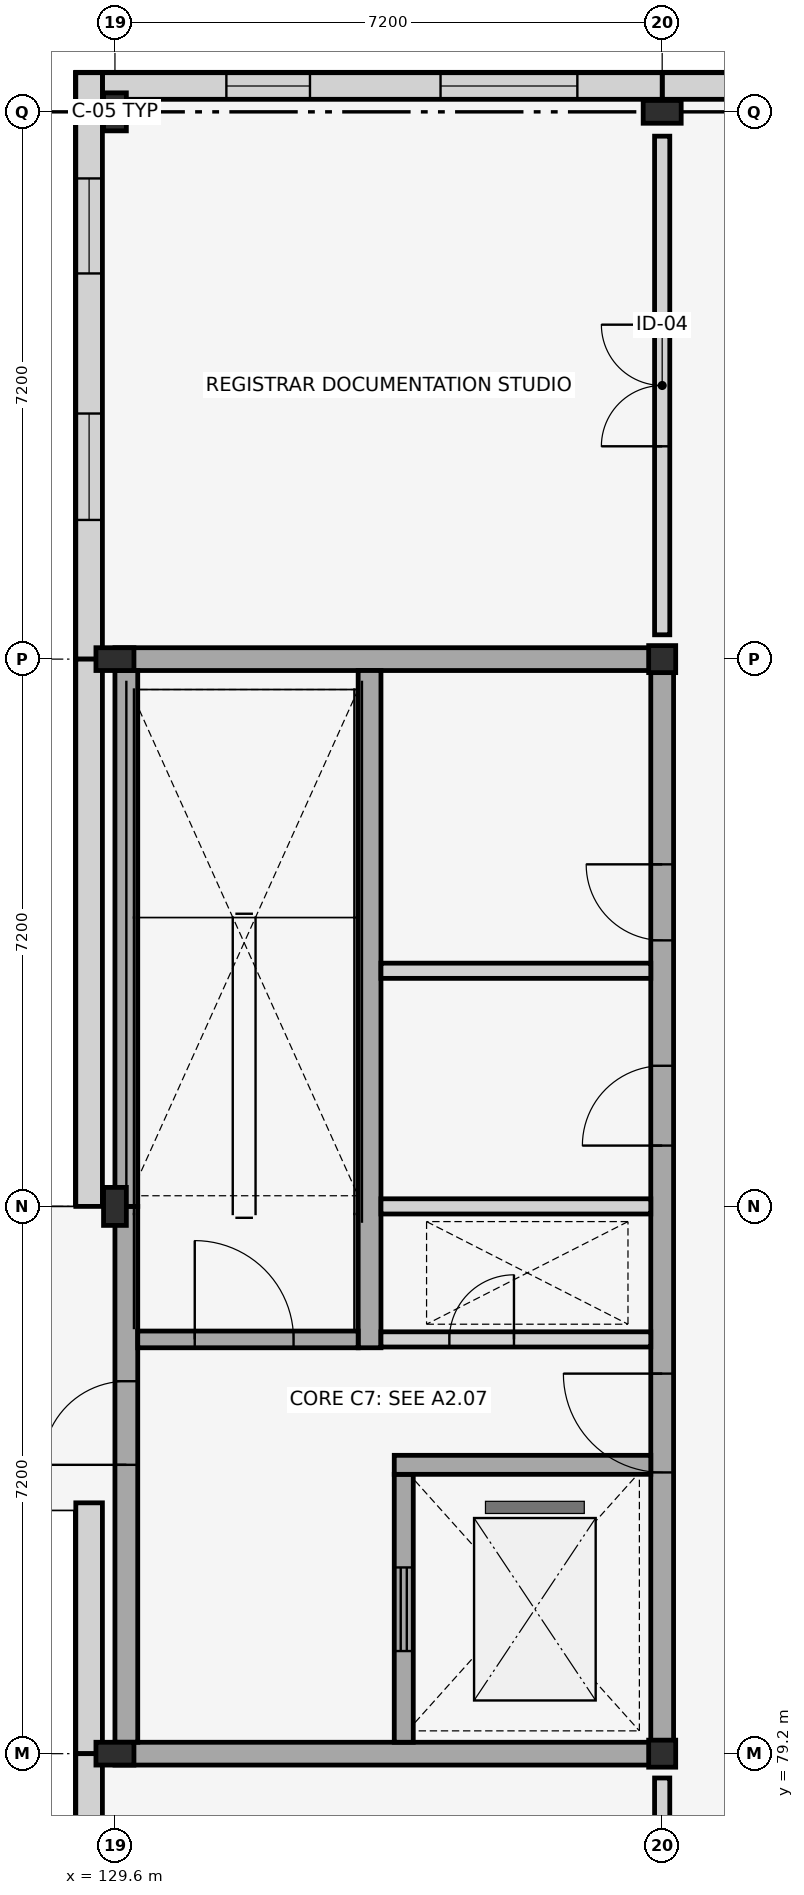
"""IFC4 building model, lengths in metres.
Left out: names, types, materials, properties, quantities, classifications, styles, units other than length and angle.
Written with IfcOpenShell. Run it as: python <this file> out.ifc"""

import sys

from ifc_helpers import new_model, si_unit, direction, frame, frame_2d, origin, origin_2d, place, context, subcontext, project, spatial, rectangle, hollow_circle, i_section, extrude, element, fill, save


model = new_model("IFC4")
c1 = context("Model", 3, precision=1e-05, world=origin(), true_north=direction((0.0, 1.0)))
c2 = subcontext(c1, "Body", "Model", "MODEL_VIEW")
j1 = project(units=[si_unit("LENGTHUNIT", "METRE"), si_unit("PLANEANGLEUNIT", "RADIAN")], contexts=[c1])
p1 = place(None, origin())
s1 = spatial("IfcSite", under=j1, at=p1, CompositionType="ELEMENT")
p2 = place(p1, origin())
s2 = spatial("IfcBuilding", under=s1, at=p2, CompositionType="ELEMENT")
p3 = place(p2, origin())
s3 = spatial("IfcBuildingStorey", under=s2, at=p3, CompositionType="ELEMENT", Elevation=0.0)
for number, where, z_axis, x_axis in (
    (1, (129.6, 79.2, 0.0), (0.0, 0.0, 1.0), (0.0, 1.0, 0.0)),
    (2, (129.6, 86.4, 0.0), (0.0, 0.0, 1.0), (1.0, 0.0, 0.0)),
    (3, (129.6, 93.6, 0.0), (0.0, 0.0, 1.0), (0.0, 1.0, 0.0)),
    (4, (129.6, 100.8, 0.0), (0.0, 0.0, 1.0), (1.0, 0.0, 0.0)),
):
    element("IfcColumn", number, at=place(p3, frame(where, z_axis=z_axis, x_axis=x_axis)), inside=s3, PredefinedType="COLUMN", context=c2, shape_type="SweptSolid", body=[
        extrude(i_section(OverallWidth=0.3, OverallDepth=0.5, WebThickness=0.014, FlangeThickness=0.028, FilletRadius=0.027, at=origin_2d()), origin(), (0.0, 0.0, 1.0), 4.5),
    ])
for number, where, z_axis, x_axis in (
    (5, (136.8, 79.2, 0.0), (0.0, 0.0, 1.0), (1.0, 0.0, 0.0)),
    (6, (136.8, 93.6, 0.0), (0.0, 0.0, 1.0), (1.0, 0.0, 0.0)),
):
    element("IfcColumn", number, at=place(p3, frame(where, z_axis=z_axis, x_axis=x_axis)), inside=s3, PredefinedType="COLUMN", context=c2, shape_type="SweptSolid", body=[
        extrude(hollow_circle(Radius=0.178, WallThickness=0.014, at=origin_2d()), origin(), (0.0, 0.0, 1.0), 4.5),
    ])
p4 = place(p3, frame((136.8, 100.8, 0.0), z_axis=(0.0, 0.0, 1.0), x_axis=(0.0, 1.0, 0.0)))
e7 = element("IfcColumn", 7, at=p4, inside=s3, PredefinedType="COLUMN", context=c2, shape_type="SweptSolid", body=[
    extrude(i_section(OverallWidth=0.3, OverallDepth=0.5, WebThickness=0.014, FlangeThickness=0.028, FilletRadius=0.027, at=origin_2d()), origin(), (0.0, 0.0, 1.0), 4.5),
])
p5 = place(p3, frame((144.0, 101.14, 0.0), z_axis=(0.0, 0.0, 1.0), x_axis=(-1.0, 0.0, 0.0)))
e8 = element("IfcWall", 8, at=p5, inside=s3, PredefinedType="STANDARD", context=c2, shape_type="SweptSolid", body=[
    extrude(rectangle(XDim=7.2, YDim=0.35, at=frame_2d((3.6, 0.0))), origin(), (0.0, 0.0, 1.0), 4.5),
])
p6 = place(p5, frame((1.266, 0.0, 0.9)))
e9 = element("IfcOpeningElement", 9, at=p6, cuts=e8, PredefinedType="OPENING", context=c2, shape_type="SweptSolid", body=[
    extrude(rectangle(XDim=1.5, YDim=2.4, at=frame_2d((0.75, 1.2))), frame((0.0, 0.185, 0.0), z_axis=(0.0, -1.0, 0.0), x_axis=(1.0, 0.0, 0.0)), (0.0, 0.0, 1.0), 0.37),
])
p7 = place(p5, frame((4.359, 0.0, 0.9)))
e10 = element("IfcOpeningElement", 10, at=p7, cuts=e8, PredefinedType="OPENING", context=c2, shape_type="SweptSolid", body=[
    extrude(rectangle(XDim=1.65, YDim=2.4, at=frame_2d((0.825, 1.2))), frame((0.0, 0.185, 0.0), z_axis=(0.0, -1.0, 0.0), x_axis=(1.0, 0.0, 0.0)), (0.0, 0.0, 1.0), 0.37),
])
p8 = place(p3, frame((136.8, 101.14, 0.0), z_axis=(0.0, 0.0, 1.0), x_axis=(-1.0, 0.0, 0.0)))
e11 = element("IfcWall", 11, at=p8, inside=s3, PredefinedType="STANDARD", context=c2, shape_type="SweptSolid", body=[
    extrude(rectangle(XDim=7.365, YDim=0.35, at=frame_2d((3.683, 0.0))), origin(), (0.0, 0.0, 1.0), 4.5),
])
p9 = place(p8, frame((1.116, 0.0, 0.9)))
e12 = element("IfcOpeningElement", 12, at=p9, cuts=e11, PredefinedType="OPENING", context=c2, shape_type="SweptSolid", body=[
    extrude(rectangle(XDim=1.8, YDim=2.4, at=frame_2d((0.9, 1.2))), frame((0.0, 0.185, 0.0), z_axis=(0.0, -1.0, 0.0), x_axis=(1.0, 0.0, 0.0)), (0.0, 0.0, 1.0), 0.37),
])
p10 = place(p8, frame((4.634, 0.0, 0.9)))
e13 = element("IfcOpeningElement", 13, at=p10, cuts=e11, PredefinedType="OPENING", context=c2, shape_type="SweptSolid", body=[
    extrude(rectangle(XDim=1.1, YDim=2.0, at=frame_2d((0.55, 1.0))), frame((0.0, 0.185, 0.0), z_axis=(0.0, -1.0, 0.0), x_axis=(1.0, 0.0, 0.0)), (0.0, 0.0, 1.0), 0.37),
])
p11 = place(p3, frame((129.26, 101.315, 0.0), z_axis=(0.0, 0.0, 1.0), x_axis=(0.0, -1.0, 0.0)))
e14 = element("IfcWall", 14, at=p11, inside=s3, PredefinedType="STANDARD", context=c2, shape_type="SweptSolid", body=[
    extrude(rectangle(XDim=7.715, YDim=0.35, at=frame_2d((3.857, 0.0))), origin(), (0.0, 0.0, 1.0), 4.5),
])
p12 = place(p11, frame((1.391, 0.0, 0.9)))
e15 = element("IfcOpeningElement", 15, at=p12, cuts=e14, PredefinedType="OPENING", context=c2, shape_type="SweptSolid", body=[
    extrude(rectangle(XDim=1.25, YDim=2.1, at=frame_2d((0.625, 1.05))), frame((0.0, 0.185, 0.0), z_axis=(0.0, -1.0, 0.0), x_axis=(1.0, 0.0, 0.0)), (0.0, 0.0, 1.0), 0.37),
])
p13 = place(p11, frame((4.484, 0.0, 0.9)))
e16 = element("IfcOpeningElement", 16, at=p13, cuts=e14, PredefinedType="OPENING", context=c2, shape_type="SweptSolid", body=[
    extrude(rectangle(XDim=1.4, YDim=2.3, at=frame_2d((0.7, 1.15))), frame((0.0, 0.185, 0.0), z_axis=(0.0, -1.0, 0.0), x_axis=(1.0, 0.0, 0.0)), (0.0, 0.0, 1.0), 0.37),
])
p14 = place(p3, frame((129.26, 93.6, 0.0), z_axis=(0.0, 0.0, 1.0), x_axis=(0.0, -1.0, 0.0)))
e17 = element("IfcWall", 17, at=p14, inside=s3, PredefinedType="STANDARD", context=c2, shape_type="SweptSolid", body=[
    extrude(rectangle(XDim=7.2, YDim=0.35, at=frame_2d((3.6, 0.0))), origin(), (0.0, 0.0, 1.0), 4.5),
])
p15 = place(p3, frame((129.26, 82.5, 0.0), z_axis=(0.0, 0.0, 1.0), x_axis=(0.0, -1.0, 0.0)))
e18 = element("IfcWall", 18, at=p15, inside=s3, PredefinedType="STANDARD", context=c2, shape_type="SweptSolid", body=[
    extrude(rectangle(XDim=3.3, YDim=0.35, at=frame_2d((1.65, 0.0))), origin(), (0.0, 0.0, 1.0), 4.5),
])
p16 = place(p3, frame((129.26, 79.2, 0.0), z_axis=(0.0, 0.0, 1.0), x_axis=(0.0, -1.0, 0.0)))
e19 = element("IfcWall", 19, at=p16, inside=s3, PredefinedType="STANDARD", context=c2, shape_type="SweptSolid", body=[
    extrude(rectangle(XDim=7.2, YDim=0.35, at=frame_2d((3.6, 0.0))), origin(), (0.0, 0.0, 1.0), 4.5),
])
p17 = place(p16, frame((1.576, 0.0, 0.9)))
e20 = element("IfcOpeningElement", 20, at=p17, cuts=e19, PredefinedType="OPENING", context=c2, shape_type="SweptSolid", body=[
    extrude(rectangle(XDim=0.88, YDim=1.54, at=frame_2d((0.44, 0.77))), frame((0.0, 0.185, 0.0), z_axis=(0.0, -1.0, 0.0), x_axis=(1.0, 0.0, 0.0)), (0.0, 0.0, 1.0), 0.37),
])
p18 = place(p16, frame((4.624, 0.0, 0.9)))
e21 = element("IfcOpeningElement", 21, at=p18, cuts=e19, PredefinedType="OPENING", context=c2, shape_type="SweptSolid", body=[
    extrude(rectangle(XDim=1.12, YDim=1.54, at=frame_2d((0.56, 0.77))), frame((0.0, 0.185, 0.0), z_axis=(0.0, -1.0, 0.0), x_axis=(1.0, 0.0, 0.0)), (0.0, 0.0, 1.0), 0.37),
])
for number, where, z_axis, x_axis in (
    (22, (129.6, 79.2, 0.0), (0.0, 0.0, 1.0), (1.0, 0.0, 0.0)),
    (23, (129.6, 93.6, 0.0), (0.0, 0.0, 1.0), (1.0, 0.0, 0.0)),
):
    element("IfcWall", number, at=place(p3, frame(where, z_axis=z_axis, x_axis=x_axis)), inside=s3, PredefinedType="SHEAR", context=c2, shape_type="SweptSolid", body=[
        extrude(rectangle(XDim=7.35, YDim=0.3, at=frame_2d((3.675, 0.0))), origin(), (0.0, 0.0, 1.0), 4.28),
    ])
p19 = place(p3, frame((129.75, 79.35, 0.0), z_axis=(0.0, 0.0, 1.0), x_axis=(0.0, 1.0, 0.0)))
e24 = element("IfcWall", 24, at=p19, inside=s3, PredefinedType="SHEAR", context=c2, shape_type="SweptSolid", body=[
    extrude(rectangle(XDim=7.05, YDim=0.3, at=frame_2d((3.525, 0.0))), origin(), (0.0, 0.0, 1.0), 4.28),
])
p20 = place(p19, frame((3.65, 0.0, 0.0)))
e25 = element("IfcOpeningElement", 25, at=p20, cuts=e24, PredefinedType="OPENING", context=c2, shape_type="SweptSolid", body=[
    extrude(rectangle(XDim=1.1, YDim=2.2, at=frame_2d((0.55, 1.1))), frame((0.0, 0.16, 0.0), z_axis=(0.0, -1.0, 0.0), x_axis=(1.0, 0.0, 0.0)), (0.0, 0.0, 1.0), 0.32),
])
p21 = place(p3, frame((129.75, 86.4, 0.0), z_axis=(0.0, 0.0, 1.0), x_axis=(0.0, 1.0, 0.0)))
e26 = element("IfcWall", 26, at=p21, inside=s3, PredefinedType="SHEAR", context=c2, shape_type="SweptSolid", body=[
    extrude(rectangle(XDim=7.05, YDim=0.3, at=frame_2d((3.525, 0.0))), origin(), (0.0, 0.0, 1.0), 4.28),
])
p22 = place(p3, frame((136.8, 79.35, 0.0), z_axis=(0.0, 0.0, 1.0), x_axis=(0.0, 1.0, 0.0)))
e27 = element("IfcWall", 27, at=p22, inside=s3, PredefinedType="SHEAR", context=c2, shape_type="SweptSolid", body=[
    extrude(rectangle(XDim=14.1, YDim=0.3, at=frame_2d((7.05, 0.0))), origin(), (0.0, 0.0, 1.0), 4.28),
])
p23 = place(p22, frame((3.55, 0.0, 0.0)))
e28 = element("IfcOpeningElement", 28, at=p23, cuts=e27, PredefinedType="OPENING", context=c2, shape_type="SweptSolid", body=[
    extrude(rectangle(XDim=1.3, YDim=2.2, at=frame_2d((0.65, 1.1))), frame((0.0, 0.16, 0.0), z_axis=(0.0, -1.0, 0.0), x_axis=(1.0, 0.0, 0.0)), (0.0, 0.0, 1.0), 0.32),
])
p24 = place(p22, frame((7.85, 0.0, 0.0)))
e29 = element("IfcOpeningElement", 29, at=p24, cuts=e27, PredefinedType="OPENING", context=c2, shape_type="SweptSolid", body=[
    extrude(rectangle(XDim=1.05, YDim=2.15, at=frame_2d((0.525, 1.075))), frame((0.0, 0.16, 0.0), z_axis=(0.0, -1.0, 0.0), x_axis=(1.0, 0.0, 0.0)), (0.0, 0.0, 1.0), 0.32),
])
p25 = place(p22, frame((10.55, 0.0, 0.0)))
e30 = element("IfcOpeningElement", 30, at=p25, cuts=e27, PredefinedType="OPENING", context=c2, shape_type="SweptSolid", body=[
    extrude(rectangle(XDim=1.0, YDim=2.15, at=frame_2d((0.5, 1.075))), frame((0.0, 0.16, 0.0), z_axis=(0.0, -1.0, 0.0), x_axis=(1.0, 0.0, 0.0)), (0.0, 0.0, 1.0), 0.32),
])
p26 = place(p3, frame((133.4, 79.35, 0.0), z_axis=(0.0, 0.0, 1.0), x_axis=(0.0, 1.0, 0.0)))
e31 = element("IfcWall", 31, at=p26, inside=s3, PredefinedType="SHEAR", context=c2, shape_type="SweptSolid", body=[
    extrude(rectangle(XDim=3.525, YDim=0.25, at=frame_2d((1.762, 0.0))), origin(), (0.0, 0.0, 1.0), 4.28),
])
p27 = place(p26, frame((1.2, 0.0, 0.0)))
e32 = element("IfcOpeningElement", 32, at=p27, cuts=e31, PredefinedType="OPENING", context=c2, shape_type="SweptSolid", body=[
    extrude(rectangle(XDim=1.1, YDim=2.15, at=frame_2d((0.55, 1.075))), frame((0.0, 0.135, 0.0), z_axis=(0.0, -1.0, 0.0), x_axis=(1.0, 0.0, 0.0)), (0.0, 0.0, 1.0), 0.27),
])
p28 = place(p3, frame((132.95, 84.54, 0.0), z_axis=(0.0, 0.0, 1.0), x_axis=(0.0, 1.0, 0.0)))
e33 = element("IfcWall", 33, at=p28, inside=s3, PredefinedType="SHEAR", context=c2, shape_type="SweptSolid", body=[
    extrude(rectangle(XDim=8.91, YDim=0.3, at=frame_2d((4.455, 0.0))), origin(), (0.0, 0.0, 1.0), 4.28),
])
p29 = place(p3, frame((133.1, 84.65, 0.0), z_axis=(0.0, 0.0, 1.0), x_axis=(1.0, 0.0, 0.0)))
e34 = element("IfcWall", 34, at=p29, inside=s3, PredefinedType="PLUMBINGWALL", context=c2, shape_type="SweptSolid", body=[
    extrude(rectangle(XDim=3.55, YDim=0.2, at=frame_2d((1.775, 0.0))), origin(), (0.0, 0.0, 1.0), 3.7),
])
p30 = place(p29, frame((0.9, 0.0, 0.0)))
e35 = element("IfcOpeningElement", 35, at=p30, cuts=e34, PredefinedType="OPENING", context=c2, shape_type="SweptSolid", body=[
    extrude(rectangle(XDim=0.85, YDim=2.05, at=frame_2d((0.425, 1.025))), frame((0.0, 0.11, 0.0), z_axis=(0.0, -1.0, 0.0), x_axis=(1.0, 0.0, 0.0)), (0.0, 0.0, 1.0), 0.22),
])
p31 = place(p3, frame((129.9, 84.65, 0.0), z_axis=(0.0, 0.0, 1.0), x_axis=(1.0, 0.0, 0.0)))
e36 = element("IfcWall", 36, at=p31, inside=s3, PredefinedType="SHEAR", context=c2, shape_type="SweptSolid", body=[
    extrude(rectangle(XDim=2.9, YDim=0.22, at=frame_2d((1.45, 0.0))), origin(), (0.0, 0.0, 1.0), 4.28),
])
p32 = place(p31, frame((0.75, 0.0, 0.0)))
e37 = element("IfcOpeningElement", 37, at=p32, cuts=e36, PredefinedType="OPENING", context=c2, shape_type="SweptSolid", body=[
    extrude(rectangle(XDim=1.3, YDim=2.2, at=frame_2d((0.65, 1.1))), frame((0.0, 0.12, 0.0), z_axis=(0.0, -1.0, 0.0), x_axis=(1.0, 0.0, 0.0)), (0.0, 0.0, 1.0), 0.24),
])
p33 = place(p3, frame((133.275, 83.0, 0.0), z_axis=(0.0, 0.0, 1.0), x_axis=(1.0, 0.0, 0.0)))
e38 = element("IfcWall", 38, at=p33, inside=s3, PredefinedType="SHEAR", context=c2, shape_type="SweptSolid", body=[
    extrude(rectangle(XDim=3.375, YDim=0.25, at=frame_2d((1.688, 0.0))), origin(), (0.0, 0.0, 1.0), 4.28),
])
for number, where, z_axis, x_axis in (
    (39, (133.1, 86.4, 0.0), (0.0, 0.0, 1.0), (1.0, 0.0, 0.0)),
    (40, (133.1, 89.5, 0.0), (0.0, 0.0, 1.0), (1.0, 0.0, 0.0)),
):
    element("IfcWall", number, at=place(p3, frame(where, z_axis=z_axis, x_axis=x_axis)), inside=s3, PredefinedType="PLUMBINGWALL", context=c2, shape_type="SweptSolid", body=[
        extrude(rectangle(XDim=3.55, YDim=0.2, at=frame_2d((1.775, 0.0))), origin(), (0.0, 0.0, 1.0), 3.7),
    ])
p34 = place(p3, frame((136.8, 93.92, 0.0), z_axis=(0.0, 0.0, 1.0), x_axis=(0.0, 1.0, 0.0)))
e41 = element("IfcWall", 41, at=p34, inside=s3, PredefinedType="PARTITIONING", context=c2, shape_type="SweptSolid", body=[
    extrude(rectangle(XDim=6.56, YDim=0.2, at=frame_2d((3.28, 0.0))), origin(), (0.0, 0.0, 1.0), 3.45),
])
p35 = place(p34, frame((2.48, 0.0, 0.0)))
e42 = element("IfcOpeningElement", 42, at=p35, cuts=e41, PredefinedType="OPENING", context=c2, shape_type="SweptSolid", body=[
    extrude(rectangle(XDim=1.6, YDim=2.35, at=frame_2d((0.8, 1.175))), frame((0.0, 0.11, 0.0), z_axis=(0.0, -1.0, 0.0), x_axis=(1.0, 0.0, 0.0)), (0.0, 0.0, 1.0), 0.22),
])
p36 = place(p3, frame((136.8, 75.92, 0.0), z_axis=(0.0, 0.0, 1.0), x_axis=(0.0, 1.0, 0.0)))
e43 = element("IfcWall", 43, at=p36, inside=s3, PredefinedType="PARTITIONING", context=c2, shape_type="SweptSolid", body=[
    extrude(rectangle(XDim=2.96, YDim=0.2, at=frame_2d((1.48, 0.0))), origin(), (0.0, 0.0, 1.0), 3.45),
])
p37 = place(p36, frame((0.98, 0.0, 0.0)))
e44 = element("IfcOpeningElement", 44, at=p37, cuts=e43, PredefinedType="OPENING", context=c2, shape_type="SweptSolid", body=[
    extrude(rectangle(XDim=1.0, YDim=2.15, at=frame_2d((0.5, 1.075))), frame((0.0, 0.11, 0.0), z_axis=(0.0, -1.0, 0.0), x_axis=(1.0, 0.0, 0.0)), (0.0, 0.0, 1.0), 0.22),
])
p38 = place(p9, origin())
e45 = element("IfcWindow", 45, at=p38, inside=s3, PartitioningType="SINGLE_PANEL", PredefinedType="WINDOW", context=c2, shape_type="SweptSolid", body=[
    extrude(rectangle(XDim=1.8, YDim=2.4, at=frame_2d((0.9, 1.2))), frame((0.0, 0.03, 0.0), z_axis=(0.0, -1.0, 0.0), x_axis=(1.0, 0.0, 0.0)), (0.0, 0.0, 1.0), 0.06),
])
fill(e12, e45)
p39 = place(p10, origin())
e46 = element("IfcWindow", 46, at=p39, inside=s3, PartitioningType="SINGLE_PANEL", PredefinedType="WINDOW", context=c2, shape_type="SweptSolid", body=[
    extrude(rectangle(XDim=1.1, YDim=2.0, at=frame_2d((0.55, 1.0))), frame((0.0, 0.03, 0.0), z_axis=(0.0, -1.0, 0.0), x_axis=(1.0, 0.0, 0.0)), (0.0, 0.0, 1.0), 0.06),
])
fill(e13, e46)
p40 = place(p12, origin())
e47 = element("IfcWindow", 47, at=p40, inside=s3, PartitioningType="SINGLE_PANEL", PredefinedType="WINDOW", context=c2, shape_type="SweptSolid", body=[
    extrude(rectangle(XDim=1.25, YDim=2.1, at=frame_2d((0.625, 1.05))), frame((0.0, 0.03, 0.0), z_axis=(0.0, -1.0, 0.0), x_axis=(1.0, 0.0, 0.0)), (0.0, 0.0, 1.0), 0.06),
])
fill(e15, e47)
p41 = place(p13, origin())
e48 = element("IfcWindow", 48, at=p41, inside=s3, PartitioningType="SINGLE_PANEL", PredefinedType="WINDOW", context=c2, shape_type="SweptSolid", body=[
    extrude(rectangle(XDim=1.4, YDim=2.3, at=frame_2d((0.7, 1.15))), frame((0.0, 0.03, 0.0), z_axis=(0.0, -1.0, 0.0), x_axis=(1.0, 0.0, 0.0)), (0.0, 0.0, 1.0), 0.06),
])
fill(e16, e48)
p42 = place(p20, origin())
e49 = element("IfcDoor", 49, at=p42, inside=s3, OperationType="SINGLE_SWING_LEFT", PredefinedType="DOOR", context=c2, shape_type="SweptSolid", body=[
    extrude(rectangle(XDim=1.1, YDim=2.2, at=frame_2d((0.55, 1.1))), frame((0.0, 0.025, 0.0), z_axis=(0.0, -1.0, 0.0), x_axis=(1.0, 0.0, 0.0)), (0.0, 0.0, 1.0), 0.05),
])
fill(e25, e49)
p43 = place(p23, origin())
e50 = element("IfcDoor", 50, at=p43, inside=s3, OperationType="SINGLE_SWING_RIGHT", PredefinedType="DOOR", context=c2, shape_type="SweptSolid", body=[
    extrude(rectangle(XDim=1.3, YDim=2.2, at=frame_2d((0.65, 1.1))), frame((0.0, 0.025, 0.0), z_axis=(0.0, -1.0, 0.0), x_axis=(1.0, 0.0, 0.0)), (0.0, 0.0, 1.0), 0.05),
])
fill(e28, e50)
p44 = place(p24, origin())
e51 = element("IfcDoor", 51, at=p44, inside=s3, OperationType="SINGLE_SWING_LEFT", PredefinedType="DOOR", context=c2, shape_type="SweptSolid", body=[
    extrude(rectangle(XDim=1.05, YDim=2.15, at=frame_2d((0.525, 1.075))), frame((0.0, 0.025, 0.0), z_axis=(0.0, -1.0, 0.0), x_axis=(1.0, 0.0, 0.0)), (0.0, 0.0, 1.0), 0.05),
])
fill(e29, e51)
p45 = place(p25, origin())
e52 = element("IfcDoor", 52, at=p45, inside=s3, OperationType="SINGLE_SWING_RIGHT", PredefinedType="DOOR", context=c2, shape_type="SweptSolid", body=[
    extrude(rectangle(XDim=1.0, YDim=2.15, at=frame_2d((0.5, 1.075))), frame((0.0, 0.025, 0.0), z_axis=(0.0, -1.0, 0.0), x_axis=(1.0, 0.0, 0.0)), (0.0, 0.0, 1.0), 0.05),
])
fill(e30, e52)
p46 = place(p27, origin())
e53 = element("IfcDoor", 53, at=p46, inside=s3, OperationType="SLIDING_TO_LEFT", PredefinedType="DOOR", context=c2, shape_type="SweptSolid", body=[
    extrude(rectangle(XDim=1.1, YDim=2.15, at=frame_2d((0.55, 1.075))), frame((0.0, 0.025, 0.0), z_axis=(0.0, -1.0, 0.0), x_axis=(1.0, 0.0, 0.0)), (0.0, 0.0, 1.0), 0.05),
])
fill(e32, e53)
p47 = place(p30, origin())
e54 = element("IfcDoor", 54, at=p47, inside=s3, OperationType="SINGLE_SWING_RIGHT", PredefinedType="TRAPDOOR", context=c2, shape_type="SweptSolid", body=[
    extrude(rectangle(XDim=0.85, YDim=2.05, at=frame_2d((0.425, 1.025))), frame((0.0, 0.025, 0.0), z_axis=(0.0, -1.0, 0.0), x_axis=(1.0, 0.0, 0.0)), (0.0, 0.0, 1.0), 0.05),
])
fill(e35, e54)
p48 = place(p32, origin())
e55 = element("IfcDoor", 55, at=p48, inside=s3, OperationType="SINGLE_SWING_LEFT", PredefinedType="DOOR", context=c2, shape_type="SweptSolid", body=[
    extrude(rectangle(XDim=1.3, YDim=2.2, at=frame_2d((0.65, 1.1))), frame((0.0, 0.025, 0.0), z_axis=(0.0, -1.0, 0.0), x_axis=(1.0, 0.0, 0.0)), (0.0, 0.0, 1.0), 0.05),
])
fill(e37, e55)
p49 = place(p35, origin())
e56 = element("IfcDoor", 56, at=p49, inside=s3, OperationType="DOUBLE_DOOR_SINGLE_SWING", PredefinedType="DOOR", context=c2, shape_type="SweptSolid", body=[
    extrude(rectangle(XDim=1.6, YDim=2.35, at=frame_2d((0.8, 1.175))), frame((0.0, 0.025, 0.0), z_axis=(0.0, -1.0, 0.0), x_axis=(1.0, 0.0, 0.0)), (0.0, 0.0, 1.0), 0.05),
])
fill(e42, e56)
save(model, sys.argv[1])
